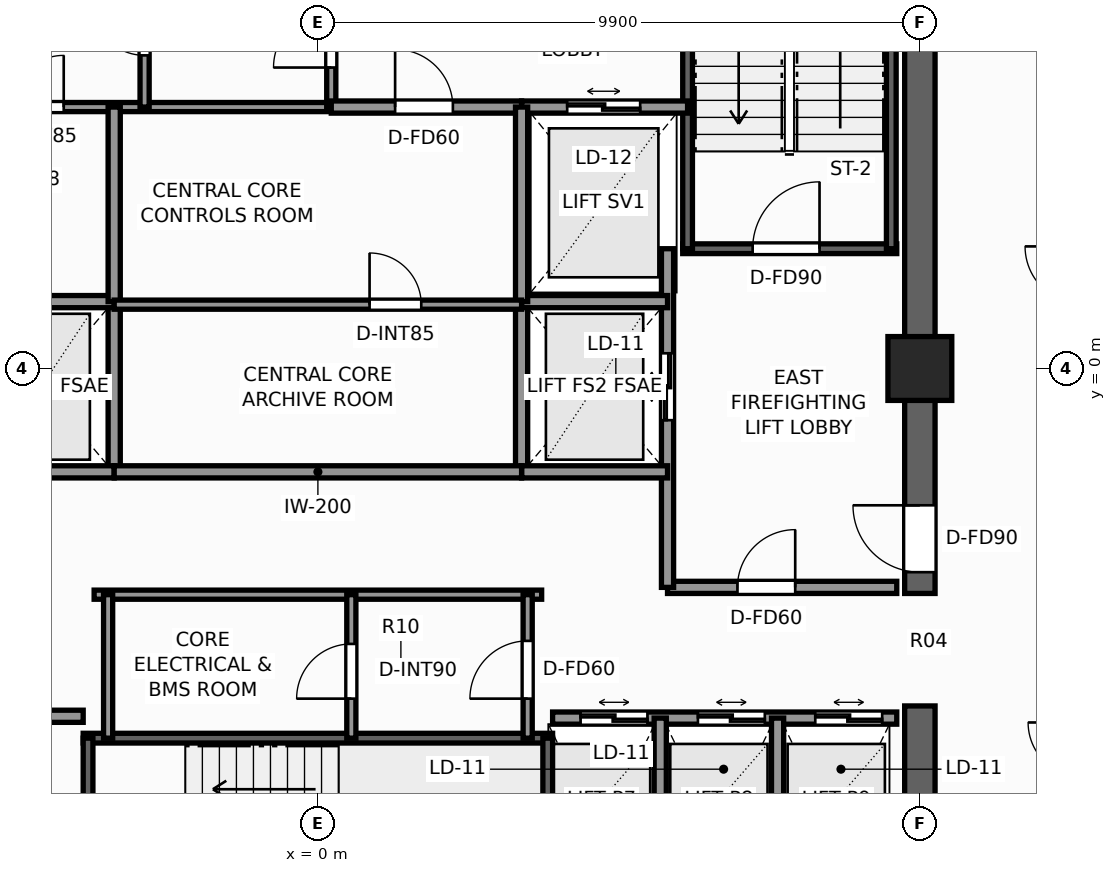
"""IFC4 building model, lengths in metres.
Left out: names, types, materials, properties, quantities, classifications, styles, units other than length and angle.
Written with IfcOpenShell. Run it as: python <this file> out.ifc"""

import sys

from ifc_helpers import new_model, si_unit, direction, frame, frame_2d, origin, origin_2d, place, context, subcontext, project, spatial, rectangle, extrude, element, fill, save


model = new_model("IFC4")
c1 = context("Model", 3, precision=1e-05, world=origin(), true_north=direction((0.0, 1.0)))
c2 = subcontext(c1, "Body", "Model", "MODEL_VIEW")
j1 = project(units=[si_unit("LENGTHUNIT", "METRE"), si_unit("PLANEANGLEUNIT", "RADIAN")], contexts=[c1])
p1 = place(None, origin())
s1 = spatial("IfcSite", under=j1, at=p1, CompositionType="ELEMENT")
p2 = place(p1, origin())
s2 = spatial("IfcBuilding", under=s1, at=p2, CompositionType="ELEMENT")
p3 = place(p2, frame((0.0, 0.0, 206.4)))
s3 = spatial("IfcBuildingStorey", under=s2, at=p3, CompositionType="ELEMENT", Elevation=206.4)
p4 = place(p3, frame((9.9, -9.65, 0.0), z_axis=(0.0, 0.0, 1.0), x_axis=(0.0, 1.0, 0.0)))
e1 = element("IfcWall", 1, at=p4, inside=s3, PredefinedType="SHEAR", context=c2, shape_type="SweptSolid", body=[
    extrude(rectangle(XDim=4.1, YDim=0.5, at=frame_2d((2.05, 0.0))), origin(), (0.0, 0.0, 1.0), 3.3),
])
p5 = place(p3, frame((9.9, -3.7, 0.0), z_axis=(0.0, 0.0, 1.0), x_axis=(0.0, 1.0, 0.0)))
e2 = element("IfcWall", 2, at=p5, inside=s3, PredefinedType="SHEAR", context=c2, shape_type="SweptSolid", body=[
    extrude(rectangle(XDim=13.35, YDim=0.5, at=frame_2d((6.675, 0.0))), origin(), (0.0, 0.0, 1.0), 3.3),
])
p6 = place(p5, frame((0.35, 0.0, 0.0)))
e3 = element("IfcOpeningElement", 3, at=p6, cuts=e2, PredefinedType="OPENING", context=c2, shape_type="SweptSolid", body=[
    extrude(rectangle(XDim=1.1, YDim=2.2, at=frame_2d((0.55, 1.1))), frame((0.0, 0.26, 0.0), z_axis=(0.0, -1.0, 0.0), x_axis=(1.0, 0.0, 0.0)), (0.0, 0.0, 1.0), 0.52),
])
p7 = place(p3, frame((9.9, 0.0, 0.0), z_axis=(0.0, 0.0, 1.0), x_axis=(1.0, 0.0, 0.0)))
e4 = element("IfcColumn", 4, at=p7, inside=s3, PredefinedType="COLUMN", context=c2, shape_type="SweptSolid", body=[
    extrude(rectangle(XDim=1.05, YDim=1.05, at=origin_2d()), origin(), (0.0, 0.0, 1.0), 3.3),
])
p8 = place(p3, frame((6.0, 1.97, 0.0), z_axis=(0.0, 0.0, 1.0), x_axis=(1.0, 0.0, 0.0)))
e5 = element("IfcWall", 5, at=p8, inside=s3, PredefinedType="SHEAR", context=c2, shape_type="SweptSolid", body=[
    extrude(rectangle(XDim=3.52, YDim=0.16, at=frame_2d((1.76, 0.0))), origin(), (0.0, 0.0, 1.0), 3.3),
])
p9 = place(p8, frame((1.15, 0.0, 0.0)))
e6 = element("IfcOpeningElement", 6, at=p9, cuts=e5, PredefinedType="OPENING", context=c2, shape_type="SweptSolid", body=[
    extrude(rectangle(XDim=1.1, YDim=2.2, at=frame_2d((0.55, 1.1))), frame((0.0, 0.09, 0.0), z_axis=(0.0, -1.0, 0.0), x_axis=(1.0, 0.0, 0.0)), (0.0, 0.0, 1.0), 0.18),
])
for number, where, z_axis, x_axis in (
    (7, (6.08, 1.97, 0.0), (0.0, 0.0, 1.0), (0.0, 1.0, 0.0)),
    (8, (9.43, 1.97, 0.0), (0.0, 0.0, 1.0), (0.0, 1.0, 0.0)),
):
    element("IfcWall", number, at=place(p3, frame(where, z_axis=z_axis, x_axis=x_axis)), inside=s3, PredefinedType="SHEAR", context=c2, shape_type="SweptSolid", body=[
        extrude(rectangle(XDim=7.56, YDim=0.16, at=frame_2d((3.78, 0.0))), origin(), (0.0, 0.0, 1.0), 3.3),
    ])
p10 = place(p3, frame((-3.86, -6.08, 0.0), z_axis=(0.0, 0.0, 1.0), x_axis=(1.0, 0.0, 0.0)))
e9 = element("IfcWall", 9, at=p10, inside=s3, PredefinedType="SHEAR", context=c2, shape_type="SweptSolid", body=[
    extrude(rectangle(XDim=7.72, YDim=0.16, at=frame_2d((3.86, 0.0))), origin(), (0.0, 0.0, 1.0), 3.3),
])
for number, where, z_axis, x_axis in (
    (10, (-3.78, -9.43, 0.0), (0.0, 0.0, 1.0), (0.0, 1.0, 0.0)),
    (11, (3.78, -9.43, 0.0), (0.0, 0.0, 1.0), (0.0, 1.0, 0.0)),
):
    element("IfcWall", number, at=place(p3, frame(where, z_axis=z_axis, x_axis=x_axis)), inside=s3, PredefinedType="SHEAR", context=c2, shape_type="SweptSolid", body=[
        extrude(rectangle(XDim=3.35, YDim=0.16, at=frame_2d((1.675, 0.0))), origin(), (0.0, 0.0, 1.0), 3.3),
    ])
p11 = place(p3, frame((-3.35, -1.7, 0.0), z_axis=(0.0, 0.0, 1.0), x_axis=(0.0, 1.0, 0.0)))
e12 = element("IfcWall", 12, at=p11, inside=s3, PredefinedType="SOLIDWALL", context=c2, shape_type="SweptSolid", body=[
    extrude(rectangle(XDim=2.8, YDim=0.2, at=frame_2d((1.4, 0.0))), origin(), (0.0, 0.0, 1.0), 3.08),
])
for number, where, z_axis, x_axis in (
    (13, (-5.75, -1.7, 0.0), (0.0, 0.0, 1.0), (1.0, 0.0, 0.0)),
    (14, (-5.75, 1.1, 0.0), (0.0, 0.0, 1.0), (1.0, 0.0, 0.0)),
):
    element("IfcWall", number, at=place(p3, frame(where, z_axis=z_axis, x_axis=x_axis)), inside=s3, PredefinedType="SOLIDWALL", context=c2, shape_type="SweptSolid", body=[
        extrude(rectangle(XDim=2.4, YDim=0.2, at=frame_2d((1.2, 0.0))), origin(), (0.0, 0.0, 1.0), 3.08),
    ])
p12 = place(p3, frame((5.75, -3.6, 0.0), z_axis=(0.0, 0.0, 1.0), x_axis=(1.0, 0.0, 0.0)))
e15 = element("IfcWall", 15, at=p12, inside=s3, PredefinedType="SOLIDWALL", context=c2, shape_type="SweptSolid", body=[
    extrude(rectangle(XDim=3.77, YDim=0.2, at=frame_2d((1.885, 0.0))), origin(), (0.0, 0.0, 1.0), 3.08),
])
p13 = place(p12, frame((1.15, 0.0, 0.0)))
e16 = element("IfcOpeningElement", 16, at=p13, cuts=e15, PredefinedType="OPENING", context=c2, shape_type="SweptSolid", body=[
    extrude(rectangle(XDim=0.95, YDim=2.06, at=frame_2d((0.475, 1.03))), frame((0.0, 0.11, 0.0), z_axis=(0.0, -1.0, 0.0), x_axis=(1.0, 0.0, 0.0)), (0.0, 0.0, 1.0), 0.22),
])
p14 = place(p3, frame((5.75, -3.6, 0.0), z_axis=(0.0, 0.0, 1.0), x_axis=(0.0, 1.0, 0.0)))
e17 = element("IfcWall", 17, at=p14, inside=s3, PredefinedType="SOLIDWALL", context=c2, shape_type="SweptSolid", body=[
    extrude(rectangle(XDim=5.57, YDim=0.2, at=frame_2d((2.785, 0.0))), origin(), (0.0, 0.0, 1.0), 3.08),
])
p15 = place(p14, frame((2.75, 0.0, 0.0)))
e18 = element("IfcOpeningElement", 18, at=p15, cuts=e17, PredefinedType="OPENING", context=c2, shape_type="SweptSolid", body=[
    extrude(rectangle(XDim=1.1, YDim=2.2, at=frame_2d((0.55, 1.1))), frame((0.0, 0.11, 0.0), z_axis=(0.0, -1.0, 0.0), x_axis=(1.0, 0.0, 0.0)), (0.0, 0.0, 1.0), 0.22),
])
p16 = place(p3, frame((3.35, -1.7, 0.0), z_axis=(0.0, 0.0, 1.0), x_axis=(0.0, 1.0, 0.0)))
e19 = element("IfcWall", 19, at=p16, inside=s3, PredefinedType="SOLIDWALL", context=c2, shape_type="SweptSolid", body=[
    extrude(rectangle(XDim=2.8, YDim=0.2, at=frame_2d((1.4, 0.0))), origin(), (0.0, 0.0, 1.0), 3.08),
])
for number, where, z_axis, x_axis in (
    (20, (3.35, -1.7, 0.0), (0.0, 0.0, 1.0), (1.0, 0.0, 0.0)),
    (21, (3.35, 1.1, 0.0), (0.0, 0.0, 1.0), (1.0, 0.0, 0.0)),
):
    element("IfcWall", number, at=place(p3, frame(where, z_axis=z_axis, x_axis=x_axis)), inside=s3, PredefinedType="SOLIDWALL", context=c2, shape_type="SweptSolid", body=[
        extrude(rectangle(XDim=2.4, YDim=0.2, at=frame_2d((1.2, 0.0))), origin(), (0.0, 0.0, 1.0), 3.08),
    ])
p17 = place(p3, frame((3.35, 4.3, 0.0), z_axis=(0.0, 0.0, 1.0), x_axis=(1.0, 0.0, 0.0)))
e22 = element("IfcWall", 22, at=p17, inside=s3, PredefinedType="SOLIDWALL", context=c2, shape_type="SweptSolid", body=[
    extrude(rectangle(XDim=2.73, YDim=0.2, at=frame_2d((1.365, 0.0))), origin(), (0.0, 0.0, 1.0), 3.08),
])
p18 = place(p17, frame((0.75, 0.0, 0.0)))
e23 = element("IfcOpeningElement", 23, at=p18, cuts=e22, PredefinedType="OPENING", context=c2, shape_type="SweptSolid", body=[
    extrude(rectangle(XDim=1.2, YDim=2.25, at=frame_2d((0.6, 1.125))), frame((0.0, 0.11, 0.0), z_axis=(0.0, -1.0, 0.0), x_axis=(1.0, 0.0, 0.0)), (0.0, 0.0, 1.0), 0.22),
])
p19 = place(p3, frame((-6.08, 4.3, 0.0), z_axis=(0.0, 0.0, 1.0), x_axis=(1.0, 0.0, 0.0)))
e24 = element("IfcWall", 24, at=p19, inside=s3, PredefinedType="PARTITIONING", context=c2, shape_type="SweptSolid", body=[
    extrude(rectangle(XDim=6.3, YDim=0.15, at=frame_2d((3.15, 0.0))), origin(), (0.0, 0.0, 1.0), 3.08),
])
p20 = place(p19, frame((1.05, 0.0, 0.0)))
e25 = element("IfcOpeningElement", 25, at=p20, cuts=e24, PredefinedType="OPENING", context=c2, shape_type="SweptSolid", body=[
    extrude(rectangle(XDim=0.85, YDim=2.03, at=frame_2d((0.425, 1.015))), frame((0.0, 0.085, 0.0), z_axis=(0.0, -1.0, 0.0), x_axis=(1.0, 0.0, 0.0)), (0.0, 0.0, 1.0), 0.17),
])
p21 = place(p3, frame((0.22, 4.3, 0.0), z_axis=(0.0, 0.0, 1.0), x_axis=(0.0, 1.0, 0.0)))
e26 = element("IfcWall", 26, at=p21, inside=s3, PredefinedType="PARTITIONING", context=c2, shape_type="SweptSolid", body=[
    extrude(rectangle(XDim=5.22, YDim=0.15, at=frame_2d((2.61, 0.0))), origin(), (0.0, 0.0, 1.0), 3.08),
])
p22 = place(p21, frame((0.65, 0.0, 0.0)))
e27 = element("IfcOpeningElement", 27, at=p22, cuts=e26, PredefinedType="OPENING", context=c2, shape_type="SweptSolid", body=[
    extrude(rectangle(XDim=0.95, YDim=2.06, at=frame_2d((0.475, 1.03))), frame((0.0, 0.085, 0.0), z_axis=(0.0, -1.0, 0.0), x_axis=(1.0, 0.0, 0.0)), (0.0, 0.0, 1.0), 0.17),
])
p23 = place(p3, frame((-2.85, 4.3, 0.0), z_axis=(0.0, 0.0, 1.0), x_axis=(0.0, 1.0, 0.0)))
e28 = element("IfcWall", 28, at=p23, inside=s3, PredefinedType="PARTITIONING", context=c2, shape_type="SweptSolid", body=[
    extrude(rectangle(XDim=5.22, YDim=0.15, at=frame_2d((2.61, 0.0))), origin(), (0.0, 0.0, 1.0), 3.08),
])
p24 = place(p23, frame((0.85, 0.0, 0.0)))
e29 = element("IfcOpeningElement", 29, at=p24, cuts=e28, PredefinedType="OPENING", context=c2, shape_type="SweptSolid", body=[
    extrude(rectangle(XDim=0.85, YDim=2.03, at=frame_2d((0.425, 1.015))), frame((0.0, 0.085, 0.0), z_axis=(0.0, -1.0, 0.0), x_axis=(1.0, 0.0, 0.0)), (0.0, 0.0, 1.0), 0.17),
])
p25 = place(p3, frame((-9.52, -5.72, 0.0), z_axis=(0.0, 0.0, 1.0), x_axis=(1.0, 0.0, 0.0)))
e30 = element("IfcWall", 30, at=p25, inside=s3, PredefinedType="SOLIDWALL", context=c2, shape_type="SweptSolid", body=[
    extrude(rectangle(XDim=5.66, YDim=0.2, at=frame_2d((2.83, 0.0))), origin(), (0.0, 0.0, 1.0), 3.08),
])
p26 = place(p25, frame((3.6, 0.0, 0.0)))
e31 = element("IfcOpeningElement", 31, at=p26, cuts=e30, PredefinedType="OPENING", context=c2, shape_type="SweptSolid", body=[
    extrude(rectangle(XDim=0.95, YDim=2.06, at=frame_2d((0.475, 1.03))), frame((0.0, 0.11, 0.0), z_axis=(0.0, -1.0, 0.0), x_axis=(1.0, 0.0, 0.0)), (0.0, 0.0, 1.0), 0.22),
])
p27 = place(p3, frame((3.86, -5.75, 0.0), z_axis=(0.0, 0.0, 1.0), x_axis=(1.0, 0.0, 0.0)))
e32 = element("IfcWall", 32, at=p27, inside=s3, PredefinedType="SOLIDWALL", context=c2, shape_type="SweptSolid", body=[
    extrude(rectangle(XDim=5.66, YDim=0.2, at=frame_2d((2.83, 0.0))), origin(), (0.0, 0.0, 1.0), 3.08),
])
p28 = place(p27, frame((0.46, 0.0, 0.0)))
e33 = element("IfcOpeningElement", 33, at=p28, cuts=e32, PredefinedType="OPENING", context=c2, shape_type="SweptSolid", body=[
    extrude(rectangle(XDim=1.1, YDim=2.2, at=frame_2d((0.55, 1.1))), frame((0.0, 0.11, 0.0), z_axis=(0.0, -1.0, 0.0), x_axis=(1.0, 0.0, 0.0)), (0.0, 0.0, 1.0), 0.22),
])
p29 = place(p27, frame((2.39, 0.0, 0.0)))
e34 = element("IfcOpeningElement", 34, at=p29, cuts=e32, PredefinedType="OPENING", context=c2, shape_type="SweptSolid", body=[
    extrude(rectangle(XDim=1.1, YDim=2.2, at=frame_2d((0.55, 1.1))), frame((0.0, 0.11, 0.0), z_axis=(0.0, -1.0, 0.0), x_axis=(1.0, 0.0, 0.0)), (0.0, 0.0, 1.0), 0.22),
])
p30 = place(p27, frame((4.32, 0.0, 0.0)))
e35 = element("IfcOpeningElement", 35, at=p30, cuts=e32, PredefinedType="OPENING", context=c2, shape_type="SweptSolid", body=[
    extrude(rectangle(XDim=1.1, YDim=2.2, at=frame_2d((0.55, 1.1))), frame((0.0, 0.11, 0.0), z_axis=(0.0, -1.0, 0.0), x_axis=(1.0, 0.0, 0.0)), (0.0, 0.0, 1.0), 0.22),
])
for number, where, z_axis, x_axis in (
    (36, (5.63, -9.52, 0.0), (0.0, 0.0, 1.0), (0.0, 1.0, 0.0)),
    (37, (7.56, -9.52, 0.0), (0.0, 0.0, 1.0), (0.0, 1.0, 0.0)),
):
    element("IfcWall", number, at=place(p3, frame(where, z_axis=z_axis, x_axis=x_axis)), inside=s3, PredefinedType="SOLIDWALL", context=c2, shape_type="SweptSolid", body=[
        extrude(rectangle(XDim=3.77, YDim=0.2, at=frame_2d((1.885, 0.0))), origin(), (0.0, 0.0, 1.0), 3.08),
    ])
p31 = place(p3, frame((0.22, 4.3, 0.0), z_axis=(0.0, 0.0, 1.0), x_axis=(1.0, 0.0, 0.0)))
e38 = element("IfcWall", 38, at=p31, inside=s3, PredefinedType="SOLIDWALL", context=c2, shape_type="SweptSolid", body=[
    extrude(rectangle(XDim=3.13, YDim=0.2, at=frame_2d((1.565, 0.0))), origin(), (0.0, 0.0, 1.0), 3.08),
])
p32 = place(p31, frame((1.05, 0.0, 0.0)))
e39 = element("IfcOpeningElement", 39, at=p32, cuts=e38, PredefinedType="OPENING", context=c2, shape_type="SweptSolid", body=[
    extrude(rectangle(XDim=0.95, YDim=2.06, at=frame_2d((0.475, 1.03))), frame((0.0, 0.11, 0.0), z_axis=(0.0, -1.0, 0.0), x_axis=(1.0, 0.0, 0.0)), (0.0, 0.0, 1.0), 0.22),
])
p33 = place(p3, frame((-3.35, -1.7, 0.0), z_axis=(0.0, 0.0, 1.0), x_axis=(1.0, 0.0, 0.0)))
e40 = element("IfcWall", 40, at=p33, inside=s3, PredefinedType="SOLIDWALL", context=c2, shape_type="SweptSolid", body=[
    extrude(rectangle(XDim=6.7, YDim=0.2, at=frame_2d((3.35, 0.0))), origin(), (0.0, 0.0, 1.0), 3.08),
])
for number, where, z_axis, x_axis in (
    (41, (-3.35, 1.1, 0.0), (0.0, 0.0, 1.0), (0.0, 1.0, 0.0)),
    (42, (3.35, 1.1, 0.0), (0.0, 0.0, 1.0), (0.0, 1.0, 0.0)),
):
    element("IfcWall", number, at=place(p3, frame(where, z_axis=z_axis, x_axis=x_axis)), inside=s3, PredefinedType="SOLIDWALL", context=c2, shape_type="SweptSolid", body=[
        extrude(rectangle(XDim=3.2, YDim=0.2, at=frame_2d((1.6, 0.0))), origin(), (0.0, 0.0, 1.0), 3.08),
    ])
p34 = place(p3, frame((-3.35, 1.05, 0.0), z_axis=(0.0, 0.0, 1.0), x_axis=(1.0, 0.0, 0.0)))
e43 = element("IfcWall", 43, at=p34, inside=s3, PredefinedType="PARTITIONING", context=c2, shape_type="SweptSolid", body=[
    extrude(rectangle(XDim=6.7, YDim=0.15, at=frame_2d((3.35, 0.0))), origin(), (0.0, 0.0, 1.0), 3.08),
])
p35 = place(p34, frame((4.2, 0.0, 0.0)))
e44 = element("IfcOpeningElement", 44, at=p35, cuts=e43, PredefinedType="OPENING", context=c2, shape_type="SweptSolid", body=[
    extrude(rectangle(XDim=0.85, YDim=2.03, at=frame_2d((0.425, 1.015))), frame((0.0, 0.085, 0.0), z_axis=(0.0, -1.0, 0.0), x_axis=(1.0, 0.0, 0.0)), (0.0, 0.0, 1.0), 0.17),
])
p36 = place(p3, frame((-3.68, -3.72, 0.0), z_axis=(0.0, 0.0, 1.0), x_axis=(1.0, 0.0, 0.0)))
e45 = element("IfcWall", 45, at=p36, inside=s3, PredefinedType="PARTITIONING", context=c2, shape_type="SweptSolid", body=[
    extrude(rectangle(XDim=7.36, YDim=0.15, at=frame_2d((3.68, 0.0))), origin(), (0.0, 0.0, 1.0), 3.08),
])
p37 = place(p3, frame((3.45, -6.08, 0.0), z_axis=(0.0, 0.0, 1.0), x_axis=(0.0, 1.0, 0.0)))
e46 = element("IfcWall", 46, at=p37, inside=s3, PredefinedType="PARTITIONING", context=c2, shape_type="SweptSolid", body=[
    extrude(rectangle(XDim=2.36, YDim=0.15, at=frame_2d((1.18, 0.0))), origin(), (0.0, 0.0, 1.0), 3.08),
])
p38 = place(p37, frame((0.65, 0.0, 0.0)))
e47 = element("IfcOpeningElement", 47, at=p38, cuts=e46, PredefinedType="OPENING", context=c2, shape_type="SweptSolid", body=[
    extrude(rectangle(XDim=0.95, YDim=2.06, at=frame_2d((0.475, 1.03))), frame((0.0, 0.085, 0.0), z_axis=(0.0, -1.0, 0.0), x_axis=(1.0, 0.0, 0.0)), (0.0, 0.0, 1.0), 0.17),
])
p39 = place(p3, frame((-3.45, -6.08, 0.0), z_axis=(0.0, 0.0, 1.0), x_axis=(0.0, 1.0, 0.0)))
e48 = element("IfcWall", 48, at=p39, inside=s3, PredefinedType="PARTITIONING", context=c2, shape_type="SweptSolid", body=[
    extrude(rectangle(XDim=2.36, YDim=0.15, at=frame_2d((1.18, 0.0))), origin(), (0.0, 0.0, 1.0), 3.08),
])
p40 = place(p3, frame((0.55, -6.08, 0.0), z_axis=(0.0, 0.0, 1.0), x_axis=(0.0, 1.0, 0.0)))
e49 = element("IfcWall", 49, at=p40, inside=s3, PredefinedType="PARTITIONING", context=c2, shape_type="SweptSolid", body=[
    extrude(rectangle(XDim=2.36, YDim=0.15, at=frame_2d((1.18, 0.0))), origin(), (0.0, 0.0, 1.0), 3.08),
])
p41 = place(p40, frame((0.65, 0.0, 0.0)))
e50 = element("IfcOpeningElement", 50, at=p41, cuts=e49, PredefinedType="OPENING", context=c2, shape_type="SweptSolid", body=[
    extrude(rectangle(XDim=0.9, YDim=2.06, at=frame_2d((0.45, 1.03))), frame((0.0, 0.085, 0.0), z_axis=(0.0, -1.0, 0.0), x_axis=(1.0, 0.0, 0.0)), (0.0, 0.0, 1.0), 0.17),
])
p42 = place(p9, origin())
e51 = element("IfcDoor", 51, at=p42, inside=s3, OperationType="SINGLE_SWING_RIGHT", PredefinedType="DOOR", context=c2, shape_type="SweptSolid", body=[
    extrude(rectangle(XDim=1.1, YDim=2.2, at=frame_2d((0.55, 1.1))), frame((0.0, 0.025, 0.0), z_axis=(0.0, -1.0, 0.0), x_axis=(1.0, 0.0, 0.0)), (0.0, 0.0, 1.0), 0.05),
])
fill(e6, e51)
p43 = place(p6, origin())
e52 = element("IfcDoor", 52, at=p43, inside=s3, OperationType="SINGLE_SWING_RIGHT", PredefinedType="DOOR", context=c2, shape_type="SweptSolid", body=[
    extrude(rectangle(XDim=1.1, YDim=2.2, at=frame_2d((0.55, 1.1))), frame((0.0, 0.025, 0.0), z_axis=(0.0, -1.0, 0.0), x_axis=(1.0, 0.0, 0.0)), (0.0, 0.0, 1.0), 0.05),
])
fill(e3, e52)
p44 = place(p15, origin())
e53 = element("IfcDoor", 53, at=p44, inside=s3, OperationType="DOUBLE_DOOR_SLIDING", PredefinedType="DOOR", context=c2, shape_type="SweptSolid", body=[
    extrude(rectangle(XDim=1.1, YDim=2.2, at=frame_2d((0.55, 1.1))), frame((0.0, 0.025, 0.0), z_axis=(0.0, -1.0, 0.0), x_axis=(1.0, 0.0, 0.0)), (0.0, 0.0, 1.0), 0.05),
])
fill(e18, e53)
p45 = place(p18, origin())
e54 = element("IfcDoor", 54, at=p45, inside=s3, OperationType="DOUBLE_DOOR_SLIDING", PredefinedType="DOOR", context=c2, shape_type="SweptSolid", body=[
    extrude(rectangle(XDim=1.2, YDim=2.25, at=frame_2d((0.6, 1.125))), frame((0.0, 0.025, 0.0), z_axis=(0.0, -1.0, 0.0), x_axis=(1.0, 0.0, 0.0)), (0.0, 0.0, 1.0), 0.05),
])
fill(e23, e54)
p46 = place(p22, origin())
e55 = element("IfcDoor", 55, at=p46, inside=s3, OperationType="SINGLE_SWING_LEFT", PredefinedType="DOOR", context=c2, shape_type="SweptSolid", body=[
    extrude(rectangle(XDim=0.95, YDim=2.06, at=frame_2d((0.475, 1.03))), frame((0.0, 0.025, 0.0), z_axis=(0.0, -1.0, 0.0), x_axis=(1.0, 0.0, 0.0)), (0.0, 0.0, 1.0), 0.05),
])
fill(e27, e55)
p47 = place(p24, origin())
e56 = element("IfcDoor", 56, at=p47, inside=s3, OperationType="SINGLE_SWING_RIGHT", PredefinedType="DOOR", context=c2, shape_type="SweptSolid", body=[
    extrude(rectangle(XDim=0.85, YDim=2.03, at=frame_2d((0.425, 1.015))), frame((0.0, 0.025, 0.0), z_axis=(0.0, -1.0, 0.0), x_axis=(1.0, 0.0, 0.0)), (0.0, 0.0, 1.0), 0.05),
])
fill(e29, e56)
p48 = place(p28, origin())
e57 = element("IfcDoor", 57, at=p48, inside=s3, OperationType="DOUBLE_DOOR_SLIDING", PredefinedType="DOOR", context=c2, shape_type="SweptSolid", body=[
    extrude(rectangle(XDim=1.1, YDim=2.2, at=frame_2d((0.55, 1.1))), frame((0.0, 0.025, 0.0), z_axis=(0.0, -1.0, 0.0), x_axis=(1.0, 0.0, 0.0)), (0.0, 0.0, 1.0), 0.05),
])
fill(e33, e57)
p49 = place(p29, origin())
e58 = element("IfcDoor", 58, at=p49, inside=s3, OperationType="DOUBLE_DOOR_SLIDING", PredefinedType="DOOR", context=c2, shape_type="SweptSolid", body=[
    extrude(rectangle(XDim=1.1, YDim=2.2, at=frame_2d((0.55, 1.1))), frame((0.0, 0.025, 0.0), z_axis=(0.0, -1.0, 0.0), x_axis=(1.0, 0.0, 0.0)), (0.0, 0.0, 1.0), 0.05),
])
fill(e34, e58)
p50 = place(p30, origin())
e59 = element("IfcDoor", 59, at=p50, inside=s3, OperationType="DOUBLE_DOOR_SLIDING", PredefinedType="DOOR", context=c2, shape_type="SweptSolid", body=[
    extrude(rectangle(XDim=1.1, YDim=2.2, at=frame_2d((0.55, 1.1))), frame((0.0, 0.025, 0.0), z_axis=(0.0, -1.0, 0.0), x_axis=(1.0, 0.0, 0.0)), (0.0, 0.0, 1.0), 0.05),
])
fill(e35, e59)
p51 = place(p13, origin())
e60 = element("IfcDoor", 60, at=p51, inside=s3, OperationType="SINGLE_SWING_RIGHT", PredefinedType="DOOR", context=c2, shape_type="SweptSolid", body=[
    extrude(rectangle(XDim=0.95, YDim=2.06, at=frame_2d((0.475, 1.03))), frame((0.0, 0.025, 0.0), z_axis=(0.0, -1.0, 0.0), x_axis=(1.0, 0.0, 0.0)), (0.0, 0.0, 1.0), 0.05),
])
fill(e16, e60)
p52 = place(p32, origin())
e61 = element("IfcDoor", 61, at=p52, inside=s3, OperationType="SINGLE_SWING_LEFT", PredefinedType="DOOR", context=c2, shape_type="SweptSolid", body=[
    extrude(rectangle(XDim=0.95, YDim=2.06, at=frame_2d((0.475, 1.03))), frame((0.0, 0.025, 0.0), z_axis=(0.0, -1.0, 0.0), x_axis=(1.0, 0.0, 0.0)), (0.0, 0.0, 1.0), 0.05),
])
fill(e39, e61)
p53 = place(p35, origin())
e62 = element("IfcDoor", 62, at=p53, inside=s3, OperationType="SINGLE_SWING_LEFT", PredefinedType="DOOR", context=c2, shape_type="SweptSolid", body=[
    extrude(rectangle(XDim=0.85, YDim=2.03, at=frame_2d((0.425, 1.015))), frame((0.0, 0.025, 0.0), z_axis=(0.0, -1.0, 0.0), x_axis=(1.0, 0.0, 0.0)), (0.0, 0.0, 1.0), 0.05),
])
fill(e44, e62)
p54 = place(p38, origin())
e63 = element("IfcDoor", 63, at=p54, inside=s3, OperationType="SINGLE_SWING_LEFT", PredefinedType="DOOR", context=c2, shape_type="SweptSolid", body=[
    extrude(rectangle(XDim=0.95, YDim=2.06, at=frame_2d((0.475, 1.03))), frame((0.0, 0.025, 0.0), z_axis=(0.0, -1.0, 0.0), x_axis=(1.0, 0.0, 0.0)), (0.0, 0.0, 1.0), 0.05),
])
fill(e47, e63)
p55 = place(p41, origin())
e64 = element("IfcDoor", 64, at=p55, inside=s3, OperationType="SINGLE_SWING_LEFT", PredefinedType="DOOR", context=c2, shape_type="SweptSolid", body=[
    extrude(rectangle(XDim=0.9, YDim=2.06, at=frame_2d((0.45, 1.03))), frame((0.0, 0.025, 0.0), z_axis=(0.0, -1.0, 0.0), x_axis=(1.0, 0.0, 0.0)), (0.0, 0.0, 1.0), 0.05),
])
fill(e50, e64)
p56 = place(p20, origin())
e65 = element("IfcDoor", 65, at=p56, inside=s3, OperationType="SINGLE_SWING_RIGHT", PredefinedType="DOOR", context=c2, shape_type="SweptSolid", body=[
    extrude(rectangle(XDim=0.85, YDim=2.03, at=frame_2d((0.425, 1.015))), frame((0.0, 0.025, 0.0), z_axis=(0.0, -1.0, 0.0), x_axis=(1.0, 0.0, 0.0)), (0.0, 0.0, 1.0), 0.05),
])
fill(e25, e65)
save(model, sys.argv[1])
